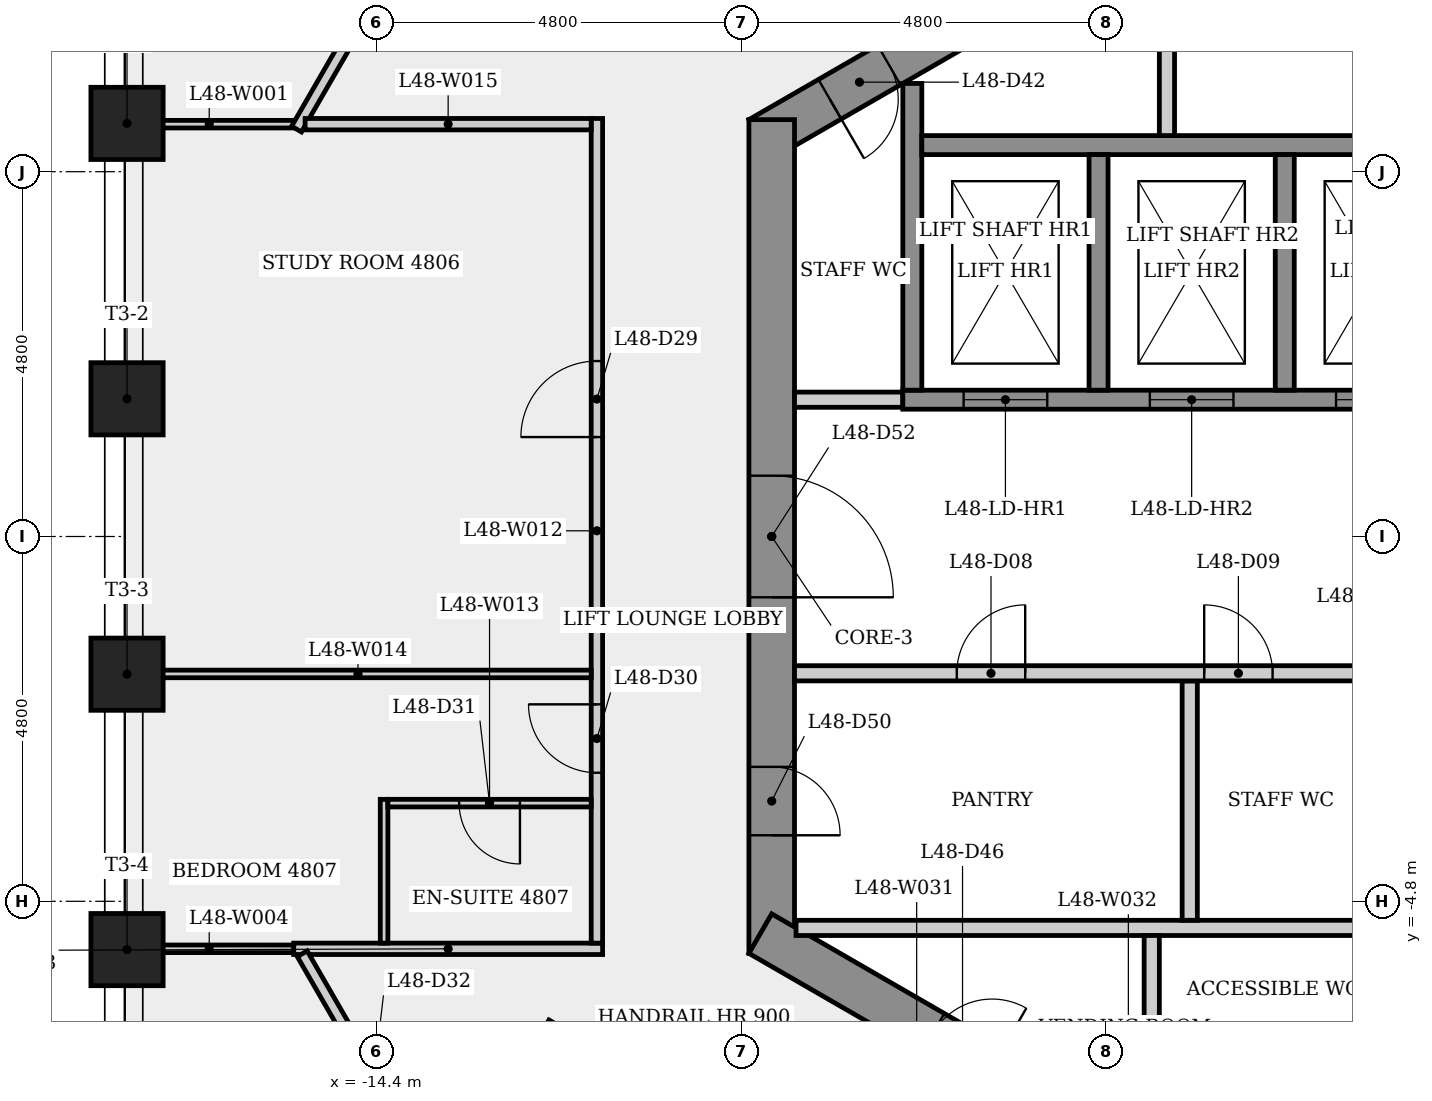
"""IFC4 building model, lengths in metres.
Left out: names, types, materials, properties, quantities, classifications, styles, units other than length and angle.
Written with IfcOpenShell. Run it as: python <this file> out.ifc"""

import sys

from ifc_helpers import new_model, si_unit, direction, frame, frame_2d, origin, origin_2d, place, context, subcontext, project, spatial, rectangle, extrude, element, fill, save


model = new_model("IFC4")
c1 = context("Model", 3, precision=1e-05, world=origin(), true_north=direction((0.0, 1.0)))
c2 = subcontext(c1, "Body", "Model", "MODEL_VIEW")
j1 = project(units=[si_unit("LENGTHUNIT", "METRE"), si_unit("PLANEANGLEUNIT", "RADIAN")], contexts=[c1])
p1 = place(None, origin())
s1 = spatial("IfcSite", under=j1, at=p1, CompositionType="ELEMENT")
p2 = place(p1, origin())
s2 = spatial("IfcBuilding", under=s1, at=p2, CompositionType="ELEMENT")
p3 = place(p2, frame((0.0, 0.0, 179.9)))
s3 = spatial("IfcBuildingStorey", under=s2, at=p3, CompositionType="ELEMENT", Elevation=179.9)
p4 = place(p3, frame((0.15, 10.71, 0.0), z_axis=(0.0, 0.0, 1.0), x_axis=(-0.866023993627, -0.500002442456, 0.0)))
e1 = element("IfcWall", 1, at=p4, inside=s3, PredefinedType="SHEAR", context=c2, shape_type="SweptSolid", body=[
    extrude(rectangle(XDim=10.97, YDim=0.6, at=frame_2d((5.485, 0.0))), origin(), (0.0, 0.0, 1.0), 3.4),
])
p5 = place(p4, frame((9.013, 0.0, 0.0)))
e2 = element("IfcOpeningElement", 2, at=p5, cuts=e1, PredefinedType="OPENING", context=c2, shape_type="SweptSolid", body=[
    extrude(rectangle(XDim=0.9, YDim=2.1, at=frame_2d((0.45, 1.05))), frame((0.0, 0.31, 0.0), z_axis=(0.0, -1.0, 0.0), x_axis=(1.0, 0.0, 0.0)), (0.0, 0.0, 1.0), 0.62),
])
p6 = place(p4, frame((2.437, 0.0, 0.0)))
e3 = element("IfcOpeningElement", 3, at=p6, cuts=e1, PredefinedType="OPENING", context=c2, shape_type="SweptSolid", body=[
    extrude(rectangle(XDim=0.9, YDim=2.1, at=frame_2d((0.45, 1.05))), frame((0.0, 0.31, 0.0), z_axis=(0.0, -1.0, 0.0), x_axis=(1.0, 0.0, 0.0)), (0.0, 0.0, 1.0), 0.62),
])
p7 = place(p3, frame((-9.2, 5.485, 0.0), z_axis=(0.0, 0.0, 1.0), x_axis=(0.0, -1.0, 0.0)))
e4 = element("IfcWall", 4, at=p7, inside=s3, PredefinedType="SHEAR", context=c2, shape_type="SweptSolid", body=[
    extrude(rectangle(XDim=10.97, YDim=0.6, at=frame_2d((5.485, 0.0))), origin(), (0.0, 0.0, 1.0), 3.4),
])
p8 = place(p7, frame((8.516, 0.0, 0.0)))
e5 = element("IfcOpeningElement", 5, at=p8, cuts=e4, PredefinedType="OPENING", context=c2, shape_type="SweptSolid", body=[
    extrude(rectangle(XDim=0.9, YDim=2.1, at=frame_2d((0.45, 1.05))), frame((0.0, 0.31, 0.0), z_axis=(0.0, -1.0, 0.0), x_axis=(1.0, 0.0, 0.0)), (0.0, 0.0, 1.0), 0.62),
])
p9 = place(p7, frame((4.685, 0.0, 0.0)))
e6 = element("IfcOpeningElement", 6, at=p9, cuts=e4, PredefinedType="OPENING", context=c2, shape_type="SweptSolid", body=[
    extrude(rectangle(XDim=1.6, YDim=2.1, at=frame_2d((0.8, 1.05))), frame((0.0, 0.31, 0.0), z_axis=(0.0, -1.0, 0.0), x_axis=(1.0, 0.0, 0.0)), (0.0, 0.0, 1.0), 0.62),
])
p10 = place(p3, frame((-9.35, -5.225, 0.0), z_axis=(0.0, 0.0, 1.0), x_axis=(0.866023993627, -0.500002442456, 0.0)))
e7 = element("IfcWall", 7, at=p10, inside=s3, PredefinedType="SHEAR", context=c2, shape_type="SweptSolid", body=[
    extrude(rectangle(XDim=10.97, YDim=0.6, at=frame_2d((5.485, 0.0))), origin(), (0.0, 0.0, 1.0), 3.4),
])
p11 = place(p10, frame((2.622, 0.0, 0.0)))
e8 = element("IfcOpeningElement", 8, at=p11, cuts=e7, PredefinedType="OPENING", context=c2, shape_type="SweptSolid", body=[
    extrude(rectangle(XDim=0.9, YDim=2.1, at=frame_2d((0.45, 1.05))), frame((0.0, 0.31, 0.0), z_axis=(0.0, -1.0, 0.0), x_axis=(1.0, 0.0, 0.0)), (0.0, 0.0, 1.0), 0.62),
])
p12 = place(p10, frame((7.172, 0.0, 0.0)))
e9 = element("IfcOpeningElement", 9, at=p12, cuts=e7, PredefinedType="OPENING", context=c2, shape_type="SweptSolid", body=[
    extrude(rectangle(XDim=0.9, YDim=2.1, at=frame_2d((0.45, 1.05))), frame((0.0, 0.31, 0.0), z_axis=(0.0, -1.0, 0.0), x_axis=(1.0, 0.0, 0.0)), (0.0, 0.0, 1.0), 0.62),
])
for number, where, z_axis, x_axis in (
    (10, (-17.682, 5.436, 0.0), (0.0, 0.0, 1.0), (-1.0, 0.0, 0.0)),
    (11, (-17.682, 1.812, 0.0), (0.0, 0.0, 1.0), (-1.0, 0.0, 0.0)),
    (12, (-17.682, -1.812, 0.0), (0.0, 0.0, 1.0), (-1.0, 0.0, 0.0)),
    (13, (-17.682, -5.436, 0.0), (0.0, 0.0, 1.0), (-1.0, 0.0, 0.0)),
):
    element("IfcColumn", number, at=place(p3, frame(where, z_axis=z_axis, x_axis=x_axis)), inside=s3, PredefinedType="COLUMN", context=c2, shape_type="SweptSolid", body=[
        extrude(rectangle(XDim=0.95, YDim=0.95, at=origin_2d()), origin(), (0.0, 0.0, 1.0), 3.4),
    ])
p13 = place(p3, frame((-15.489, 5.425, 0.0), z_axis=(0.0, 0.0, 1.0), x_axis=(-1.0, 0.0, 0.0)))
e14 = element("IfcWall", 14, at=p13, inside=s3, PredefinedType="PARTITIONING", context=c2, shape_type="SweptSolid", body=[
    extrude(rectangle(XDim=2.223, YDim=0.1, at=frame_2d((1.111, 0.0))), origin(), (0.0, 0.0, 1.0), 3.05),
])
p14 = place(p3, frame((-15.452, 5.36, 0.0), z_axis=(0.0, 0.0, 1.0), x_axis=(0.500013134444, 0.866017820477, 0.0)))
e15 = element("IfcWall", 15, at=p14, inside=s3, PredefinedType="PARTITIONING", context=c2, shape_type="SweptSolid", body=[
    extrude(rectangle(XDim=6.737, YDim=0.15, at=frame_2d((3.369, 0.0))), origin(), (0.0, 0.0, 1.0), 3.05),
])
p15 = place(p14, frame((2.869, 0.0, 0.0)))
e16 = element("IfcOpeningElement", 16, at=p15, cuts=e15, PredefinedType="OPENING", context=c2, shape_type="SweptSolid", body=[
    extrude(rectangle(XDim=1.0, YDim=2.1, at=frame_2d((0.5, 1.05))), frame((0.0, 0.085, 0.0), z_axis=(0.0, -1.0, 0.0), x_axis=(1.0, 0.0, 0.0)), (0.0, 0.0, 1.0), 0.17),
])
p16 = place(p3, frame((-15.489, -5.425, 0.0), z_axis=(0.0, 0.0, 1.0), x_axis=(1.0, 0.0, 0.0)))
e17 = element("IfcWall", 17, at=p16, inside=s3, PredefinedType="PARTITIONING", context=c2, shape_type="SweptSolid", body=[
    extrude(rectangle(XDim=4.064, YDim=0.15, at=frame_2d((2.032, 0.0))), origin(), (0.0, 0.0, 1.0), 3.05),
])
p17 = place(p3, frame((-15.489, -5.425, 0.0), z_axis=(0.0, 0.0, 1.0), x_axis=(-1.0, 0.0, 0.0)))
e18 = element("IfcWall", 18, at=p17, inside=s3, PredefinedType="PARTITIONING", context=c2, shape_type="SweptSolid", body=[
    extrude(rectangle(XDim=2.223, YDim=0.1, at=frame_2d((1.111, 0.0))), origin(), (0.0, 0.0, 1.0), 3.05),
])
p18 = place(p3, frame((-14.3, -3.458, 0.0), z_axis=(0.0, 0.0, 1.0), x_axis=(0.0, -1.0, 0.0)))
e19 = element("IfcWall", 19, at=p18, inside=s3, PredefinedType="PARTITIONING", context=c2, shape_type="SweptSolid", body=[
    extrude(rectangle(XDim=1.892, YDim=0.1, at=frame_2d((0.946, 0.0))), origin(), (0.0, 0.0, 1.0), 3.05),
])
p19 = place(p3, frame((-13.648, -9.239, 0.0), z_axis=(0.0, 0.0, 1.0), x_axis=(0.500017246033, 0.866015446554, 0.0)))
e20 = element("IfcWall", 20, at=p19, inside=s3, PredefinedType="SHEAR", context=c2, shape_type="SweptSolid", body=[
    extrude(rectangle(XDim=3.25, YDim=0.25, at=frame_2d((1.625, 0.0))), origin(), (0.0, 0.0, 1.0), 3.05),
])
p20 = place(p3, frame((-13.493, -8.753, 0.0), z_axis=(0.0, 0.0, 1.0), x_axis=(-0.500006623535, 0.866021579651, 0.0)))
e21 = element("IfcWall", 21, at=p20, inside=s3, PredefinedType="PARTITIONING", context=c2, shape_type="SweptSolid", body=[
    extrude(rectangle(XDim=3.768, YDim=0.15, at=frame_2d((1.884, 0.0))), origin(), (0.0, 0.0, 1.0), 3.05),
])
p21 = place(p20, frame((1.384, 0.0, 0.0)))
e22 = element("IfcOpeningElement", 22, at=p21, cuts=e21, PredefinedType="OPENING", context=c2, shape_type="SweptSolid", body=[
    extrude(rectangle(XDim=1.0, YDim=2.1, at=frame_2d((0.5, 1.05))), frame((0.0, 0.085, 0.0), z_axis=(0.0, -1.0, 0.0), x_axis=(1.0, 0.0, 0.0)), (0.0, 0.0, 1.0), 0.17),
])
p22 = place(p3, frame((-11.5, -5.35, 0.0), z_axis=(0.0, 0.0, 1.0), x_axis=(0.0, 1.0, 0.0)))
e23 = element("IfcWall", 23, at=p22, inside=s3, PredefinedType="PARTITIONING", context=c2, shape_type="SweptSolid", body=[
    extrude(rectangle(XDim=10.85, YDim=0.15, at=frame_2d((5.425, 0.0))), origin(), (0.0, 0.0, 1.0), 3.05),
])
p23 = place(p22, frame((6.659, 0.0, 0.0)))
e24 = element("IfcOpeningElement", 24, at=p23, cuts=e23, PredefinedType="OPENING", context=c2, shape_type="SweptSolid", body=[
    extrude(rectangle(XDim=1.0, YDim=2.1, at=frame_2d((0.5, 1.05))), frame((0.0, 0.085, 0.0), z_axis=(0.0, -1.0, 0.0), x_axis=(1.0, 0.0, 0.0)), (0.0, 0.0, 1.0), 0.17),
])
p24 = place(p22, frame((2.242, 0.0, 0.0)))
e25 = element("IfcOpeningElement", 25, at=p24, cuts=e23, PredefinedType="OPENING", context=c2, shape_type="SweptSolid", body=[
    extrude(rectangle(XDim=0.9, YDim=2.1, at=frame_2d((0.45, 1.05))), frame((0.0, 0.085, 0.0), z_axis=(0.0, -1.0, 0.0), x_axis=(1.0, 0.0, 0.0)), (0.0, 0.0, 1.0), 0.17),
])
p25 = place(p3, frame((-11.575, -3.508, 0.0), z_axis=(0.0, 0.0, 1.0), x_axis=(-1.0, 0.0, 0.0)))
e26 = element("IfcWall", 26, at=p25, inside=s3, PredefinedType="PARTITIONING", context=c2, shape_type="SweptSolid", body=[
    extrude(rectangle(XDim=2.675, YDim=0.1, at=frame_2d((1.337, 0.0))), origin(), (0.0, 0.0, 1.0), 3.05),
])
p26 = place(p25, frame((0.938, 0.0, 0.0)))
e27 = element("IfcOpeningElement", 27, at=p26, cuts=e26, PredefinedType="OPENING", context=c2, shape_type="SweptSolid", body=[
    extrude(rectangle(XDim=0.8, YDim=2.1, at=frame_2d((0.4, 1.05))), frame((0.0, 0.06, 0.0), z_axis=(0.0, -1.0, 0.0), x_axis=(1.0, 0.0, 0.0)), (0.0, 0.0, 1.0), 0.12),
])
p27 = place(p3, frame((-11.575, -1.808, 0.0), z_axis=(0.0, 0.0, 1.0), x_axis=(-1.0, 0.0, 0.0)))
e28 = element("IfcWall", 28, at=p27, inside=s3, PredefinedType="PARTITIONING", context=c2, shape_type="SweptSolid", body=[
    extrude(rectangle(XDim=6.137, YDim=0.1, at=frame_2d((3.068, 0.0))), origin(), (0.0, 0.0, 1.0), 3.05),
])
p28 = place(p3, frame((-11.575, 5.425, 0.0), z_axis=(0.0, 0.0, 1.0), x_axis=(-1.0, 0.0, 0.0)))
e29 = element("IfcWall", 29, at=p28, inside=s3, PredefinedType="PARTITIONING", context=c2, shape_type="SweptSolid", body=[
    extrude(rectangle(XDim=3.764, YDim=0.15, at=frame_2d((1.882, 0.0))), origin(), (0.0, 0.0, 1.0), 3.05),
])
p29 = place(p3, frame((-8.9, 1.8, 0.0), z_axis=(0.0, 0.0, 1.0), x_axis=(1.0, 0.0, 0.0)))
e30 = element("IfcWall", 30, at=p29, inside=s3, PredefinedType="PARTITIONING", context=c2, shape_type="SweptSolid", body=[
    extrude(rectangle(XDim=1.425, YDim=0.2, at=frame_2d((0.712, 0.0))), origin(), (0.0, 0.0, 1.0), 3.05),
])
p30 = place(p3, frame((-8.88, -5.15, 0.0), z_axis=(0.0, 0.0, 1.0), x_axis=(1.0, 0.0, 0.0)))
e31 = element("IfcWall", 31, at=p30, inside=s3, PredefinedType="PARTITIONING", context=c2, shape_type="SweptSolid", body=[
    extrude(rectangle(XDim=11.205, YDim=0.2, at=frame_2d((5.603, 0.0))), origin(), (0.0, 0.0, 1.0), 3.05),
])
p31 = place(p3, frame((-7.475, 1.8, 0.0), z_axis=(0.0, 0.0, 1.0), x_axis=(1.0, 0.0, 0.0)))
e32 = element("IfcWall", 32, at=p31, inside=s3, PredefinedType="SHEAR", context=c2, shape_type="SweptSolid", body=[
    extrude(rectangle(XDim=14.95, YDim=0.25, at=frame_2d((7.475, 0.0))), origin(), (0.0, 0.0, 1.0), 3.05),
])
p32 = place(p31, frame((0.8, 0.0, 0.0)))
e33 = element("IfcOpeningElement", 33, at=p32, cuts=e32, PredefinedType="OPENING", context=c2, shape_type="SweptSolid", body=[
    extrude(rectangle(XDim=1.1, YDim=2.1, at=frame_2d((0.55, 1.05))), frame((0.0, 0.135, 0.0), z_axis=(0.0, -1.0, 0.0), x_axis=(1.0, 0.0, 0.0)), (0.0, 0.0, 1.0), 0.27),
])
p33 = place(p31, frame((3.25, 0.0, 0.0)))
e34 = element("IfcOpeningElement", 34, at=p33, cuts=e32, PredefinedType="OPENING", context=c2, shape_type="SweptSolid", body=[
    extrude(rectangle(XDim=1.1, YDim=2.1, at=frame_2d((0.55, 1.05))), frame((0.0, 0.135, 0.0), z_axis=(0.0, -1.0, 0.0), x_axis=(1.0, 0.0, 0.0)), (0.0, 0.0, 1.0), 0.27),
])
p34 = place(p31, frame((5.7, 0.0, 0.0)))
e35 = element("IfcOpeningElement", 35, at=p34, cuts=e32, PredefinedType="OPENING", context=c2, shape_type="SweptSolid", body=[
    extrude(rectangle(XDim=1.1, YDim=2.1, at=frame_2d((0.55, 1.05))), frame((0.0, 0.135, 0.0), z_axis=(0.0, -1.0, 0.0), x_axis=(1.0, 0.0, 0.0)), (0.0, 0.0, 1.0), 0.27),
])
p35 = place(p31, frame((8.15, 0.0, 0.0)))
e36 = element("IfcOpeningElement", 36, at=p35, cuts=e32, PredefinedType="OPENING", context=c2, shape_type="SweptSolid", body=[
    extrude(rectangle(XDim=1.1, YDim=2.1, at=frame_2d((0.55, 1.05))), frame((0.0, 0.135, 0.0), z_axis=(0.0, -1.0, 0.0), x_axis=(1.0, 0.0, 0.0)), (0.0, 0.0, 1.0), 0.27),
])
p36 = place(p31, frame((10.6, 0.0, 0.0)))
e37 = element("IfcOpeningElement", 37, at=p36, cuts=e32, PredefinedType="OPENING", context=c2, shape_type="SweptSolid", body=[
    extrude(rectangle(XDim=1.1, YDim=2.1, at=frame_2d((0.55, 1.05))), frame((0.0, 0.135, 0.0), z_axis=(0.0, -1.0, 0.0), x_axis=(1.0, 0.0, 0.0)), (0.0, 0.0, 1.0), 0.27),
])
p37 = place(p31, frame((13.05, 0.0, 0.0)))
e38 = element("IfcOpeningElement", 38, at=p37, cuts=e32, PredefinedType="OPENING", context=c2, shape_type="SweptSolid", body=[
    extrude(rectangle(XDim=1.1, YDim=2.1, at=frame_2d((0.55, 1.05))), frame((0.0, 0.135, 0.0), z_axis=(0.0, -1.0, 0.0), x_axis=(1.0, 0.0, 0.0)), (0.0, 0.0, 1.0), 0.27),
])
p38 = place(p3, frame((-7.35, 1.925, 0.0), z_axis=(0.0, 0.0, 1.0), x_axis=(0.0, 1.0, 0.0)))
e39 = element("IfcWall", 39, at=p38, inside=s3, PredefinedType="SHEAR", context=c2, shape_type="SweptSolid", body=[
    extrude(rectangle(XDim=4.036, YDim=0.25, at=frame_2d((2.018, 0.0))), origin(), (0.0, 0.0, 1.0), 3.05),
])
p39 = place(p3, frame((-7.225, 5.15, 0.0), z_axis=(0.0, 0.0, 1.0), x_axis=(1.0, 0.0, 0.0)))
e40 = element("IfcWall", 40, at=p39, inside=s3, PredefinedType="SHEAR", context=c2, shape_type="SweptSolid", body=[
    extrude(rectangle(XDim=14.7, YDim=0.25, at=frame_2d((7.35, 0.0))), origin(), (0.0, 0.0, 1.0), 3.05),
])
p40 = place(p3, frame((-4.9, 5.025, 0.0), z_axis=(0.0, 0.0, 1.0), x_axis=(0.0, -1.0, 0.0)))
e41 = element("IfcWall", 41, at=p40, inside=s3, PredefinedType="SHEAR", context=c2, shape_type="SweptSolid", body=[
    extrude(rectangle(XDim=3.1, YDim=0.25, at=frame_2d((1.55, 0.0))), origin(), (0.0, 0.0, 1.0), 3.4),
])
p41 = place(p3, frame((-4.2, -5.25, 0.0), z_axis=(0.0, 0.0, 1.0), x_axis=(0.0, -1.0, 0.0)))
e42 = element("IfcWall", 42, at=p41, inside=s3, PredefinedType="PARTITIONING", context=c2, shape_type="SweptSolid", body=[
    extrude(rectangle(XDim=2.602, YDim=0.2, at=frame_2d((1.301, 0.0))), origin(), (0.0, 0.0, 1.0), 3.05),
])
p42 = place(p3, frame((-4.0, 7.967, 0.0), z_axis=(0.0, 0.0, 1.0), x_axis=(0.0, -1.0, 0.0)))
e43 = element("IfcWall", 43, at=p42, inside=s3, PredefinedType="PARTITIONING", context=c2, shape_type="SweptSolid", body=[
    extrude(rectangle(XDim=2.692, YDim=0.2, at=frame_2d((1.346, 0.0))), origin(), (0.0, 0.0, 1.0), 3.05),
])
p43 = place(p3, frame((-3.7, -1.9, 0.0), z_axis=(0.0, 0.0, 1.0), x_axis=(0.0, -1.0, 0.0)))
e44 = element("IfcWall", 44, at=p43, inside=s3, PredefinedType="PARTITIONING", context=c2, shape_type="SweptSolid", body=[
    extrude(rectangle(XDim=3.15, YDim=0.2, at=frame_2d((1.575, 0.0))), origin(), (0.0, 0.0, 1.0), 3.05),
])
p44 = place(p3, frame((-8.9, -1.8, 0.0), z_axis=(0.0, 0.0, 1.0), x_axis=(1.0, 0.0, 0.0)))
e45 = element("IfcWall", 45, at=p44, inside=s3, PredefinedType="PARTITIONING", context=c2, shape_type="SweptSolid", body=[
    extrude(rectangle(XDim=11.225, YDim=0.2, at=frame_2d((5.613, 0.0))), origin(), (0.0, 0.0, 1.0), 3.05),
])
p45 = place(p44, frame((2.135, 0.0, 0.0)))
e46 = element("IfcOpeningElement", 46, at=p45, cuts=e45, PredefinedType="OPENING", context=c2, shape_type="SweptSolid", body=[
    extrude(rectangle(XDim=0.9, YDim=2.1, at=frame_2d((0.45, 1.05))), frame((0.0, 0.11, 0.0), z_axis=(0.0, -1.0, 0.0), x_axis=(1.0, 0.0, 0.0)), (0.0, 0.0, 1.0), 0.22),
])
p46 = place(p44, frame((5.39, 0.0, 0.0)))
e47 = element("IfcOpeningElement", 47, at=p46, cuts=e45, PredefinedType="OPENING", context=c2, shape_type="SweptSolid", body=[
    extrude(rectangle(XDim=0.9, YDim=2.1, at=frame_2d((0.45, 1.05))), frame((0.0, 0.11, 0.0), z_axis=(0.0, -1.0, 0.0), x_axis=(1.0, 0.0, 0.0)), (0.0, 0.0, 1.0), 0.22),
])
p47 = place(p44, frame((9.613, 0.0, 0.0)))
e48 = element("IfcOpeningElement", 48, at=p47, cuts=e45, PredefinedType="OPENING", context=c2, shape_type="SweptSolid", body=[
    extrude(rectangle(XDim=0.9, YDim=2.1, at=frame_2d((0.45, 1.05))), frame((0.0, 0.11, 0.0), z_axis=(0.0, -1.0, 0.0), x_axis=(1.0, 0.0, 0.0)), (0.0, 0.0, 1.0), 0.22),
])
p48 = place(p3, frame((-2.45, 5.025, 0.0), z_axis=(0.0, 0.0, 1.0), x_axis=(0.0, -1.0, 0.0)))
e49 = element("IfcWall", 49, at=p48, inside=s3, PredefinedType="SHEAR", context=c2, shape_type="SweptSolid", body=[
    extrude(rectangle(XDim=3.1, YDim=0.25, at=frame_2d((1.55, 0.0))), origin(), (0.0, 0.0, 1.0), 3.4),
])
p49 = place(p32, origin())
e50 = element("IfcDoor", 50, at=p49, inside=s3, OperationType="SLIDING_TO_LEFT", PredefinedType="DOOR", context=c2, shape_type="SweptSolid", body=[
    extrude(rectangle(XDim=1.1, YDim=2.1, at=frame_2d((0.55, 1.05))), frame((0.0, 0.025, 0.0), z_axis=(0.0, -1.0, 0.0), x_axis=(1.0, 0.0, 0.0)), (0.0, 0.0, 1.0), 0.05),
])
fill(e33, e50)
p50 = place(p33, origin())
e51 = element("IfcDoor", 51, at=p50, inside=s3, OperationType="SLIDING_TO_LEFT", PredefinedType="DOOR", context=c2, shape_type="SweptSolid", body=[
    extrude(rectangle(XDim=1.1, YDim=2.1, at=frame_2d((0.55, 1.05))), frame((0.0, 0.025, 0.0), z_axis=(0.0, -1.0, 0.0), x_axis=(1.0, 0.0, 0.0)), (0.0, 0.0, 1.0), 0.05),
])
fill(e34, e51)
p51 = place(p34, origin())
e52 = element("IfcDoor", 52, at=p51, inside=s3, OperationType="SLIDING_TO_LEFT", PredefinedType="DOOR", context=c2, shape_type="SweptSolid", body=[
    extrude(rectangle(XDim=1.1, YDim=2.1, at=frame_2d((0.55, 1.05))), frame((0.0, 0.025, 0.0), z_axis=(0.0, -1.0, 0.0), x_axis=(1.0, 0.0, 0.0)), (0.0, 0.0, 1.0), 0.05),
])
fill(e35, e52)
p52 = place(p45, origin())
e53 = element("IfcDoor", 53, at=p52, inside=s3, OperationType="SINGLE_SWING_RIGHT", PredefinedType="DOOR", context=c2, shape_type="SweptSolid", body=[
    extrude(rectangle(XDim=0.9, YDim=2.1, at=frame_2d((0.45, 1.05))), frame((0.0, 0.025, 0.0), z_axis=(0.0, -1.0, 0.0), x_axis=(1.0, 0.0, 0.0)), (0.0, 0.0, 1.0), 0.05),
])
fill(e46, e53)
p53 = place(p46, origin())
e54 = element("IfcDoor", 54, at=p53, inside=s3, OperationType="SINGLE_SWING_LEFT", PredefinedType="DOOR", context=c2, shape_type="SweptSolid", body=[
    extrude(rectangle(XDim=0.9, YDim=2.1, at=frame_2d((0.45, 1.05))), frame((0.0, 0.025, 0.0), z_axis=(0.0, -1.0, 0.0), x_axis=(1.0, 0.0, 0.0)), (0.0, 0.0, 1.0), 0.05),
])
fill(e47, e54)
p54 = place(p23, origin())
e55 = element("IfcDoor", 55, at=p54, inside=s3, OperationType="SINGLE_SWING_LEFT", PredefinedType="DOOR", context=c2, shape_type="SweptSolid", body=[
    extrude(rectangle(XDim=1.0, YDim=2.1, at=frame_2d((0.5, 1.05))), frame((0.0, 0.025, 0.0), z_axis=(0.0, -1.0, 0.0), x_axis=(1.0, 0.0, 0.0)), (0.0, 0.0, 1.0), 0.05),
])
fill(e24, e55)
p55 = place(p24, origin())
e56 = element("IfcDoor", 56, at=p55, inside=s3, OperationType="SINGLE_SWING_RIGHT", PredefinedType="DOOR", context=c2, shape_type="SweptSolid", body=[
    extrude(rectangle(XDim=0.9, YDim=2.1, at=frame_2d((0.45, 1.05))), frame((0.0, 0.025, 0.0), z_axis=(0.0, -1.0, 0.0), x_axis=(1.0, 0.0, 0.0)), (0.0, 0.0, 1.0), 0.05),
])
fill(e25, e56)
p56 = place(p26, origin())
e57 = element("IfcDoor", 57, at=p56, inside=s3, OperationType="SINGLE_SWING_LEFT", PredefinedType="DOOR", context=c2, shape_type="SweptSolid", body=[
    extrude(rectangle(XDim=0.8, YDim=2.1, at=frame_2d((0.4, 1.05))), frame((0.0, 0.025, 0.0), z_axis=(0.0, -1.0, 0.0), x_axis=(1.0, 0.0, 0.0)), (0.0, 0.0, 1.0), 0.05),
])
fill(e27, e57)
p57 = place(p5, origin())
e58 = element("IfcDoor", 58, at=p57, inside=s3, OperationType="SINGLE_SWING_RIGHT", PredefinedType="DOOR", context=c2, shape_type="SweptSolid", body=[
    extrude(rectangle(XDim=0.9, YDim=2.1, at=frame_2d((0.45, 1.05))), frame((0.0, 0.025, 0.0), z_axis=(0.0, -1.0, 0.0), x_axis=(1.0, 0.0, 0.0)), (0.0, 0.0, 1.0), 0.05),
])
fill(e2, e58)
p58 = place(p8, origin())
e59 = element("IfcDoor", 59, at=p58, inside=s3, OperationType="SINGLE_SWING_RIGHT", PredefinedType="DOOR", context=c2, shape_type="SweptSolid", body=[
    extrude(rectangle(XDim=0.9, YDim=2.1, at=frame_2d((0.45, 1.05))), frame((0.0, 0.025, 0.0), z_axis=(0.0, -1.0, 0.0), x_axis=(1.0, 0.0, 0.0)), (0.0, 0.0, 1.0), 0.05),
])
fill(e5, e59)
p59 = place(p9, origin())
e60 = element("IfcDoor", 60, at=p59, inside=s3, OperationType="SINGLE_SWING_RIGHT", PredefinedType="DOOR", context=c2, shape_type="SweptSolid", body=[
    extrude(rectangle(XDim=1.6, YDim=2.1, at=frame_2d((0.8, 1.05))), frame((0.0, 0.025, 0.0), z_axis=(0.0, -1.0, 0.0), x_axis=(1.0, 0.0, 0.0)), (0.0, 0.0, 1.0), 0.05),
])
fill(e6, e60)
save(model, sys.argv[1])
